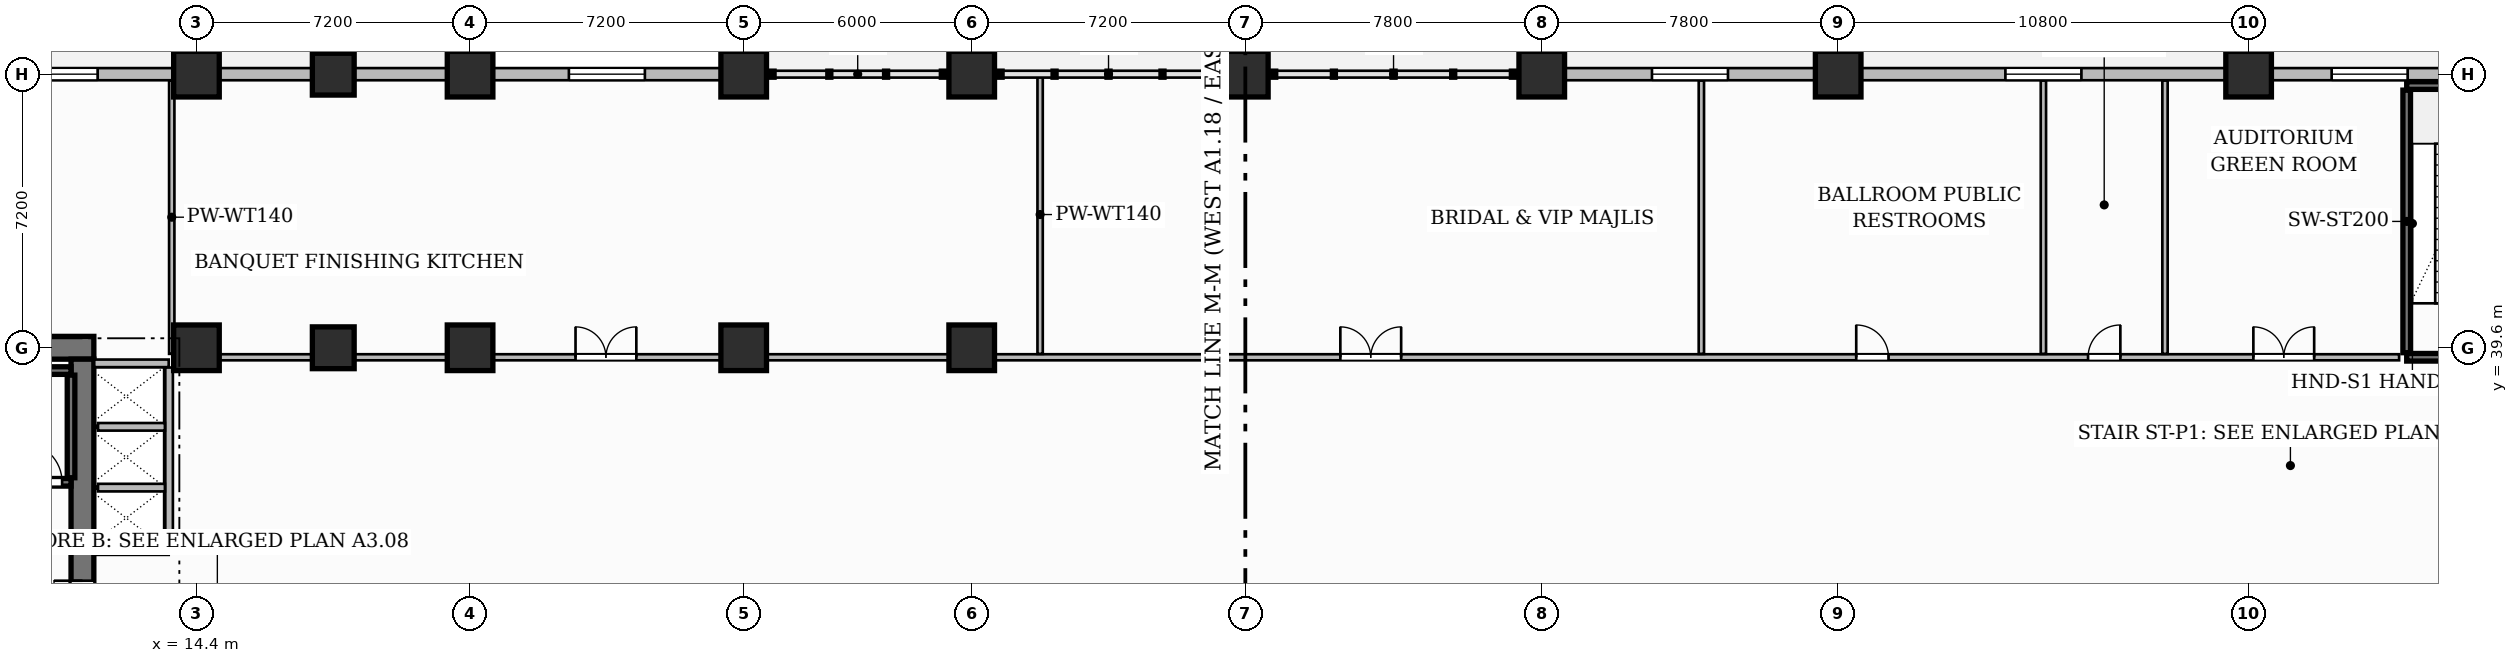
"""IFC4 building model, lengths in metres.
Left out: names, types, materials, properties, quantities, classifications, styles, units other than length and angle.
Written with IfcOpenShell. Run it as: python <this file> out.ifc"""

import sys

from ifc_helpers import new_model, si_unit, direction, frame, frame_2d, origin, origin_2d, place, context, subcontext, project, spatial, rectangle, extrude, source, transform, mapped, element, fill, save


model = new_model("IFC4")
c1 = context("Model", 3, precision=1e-05, world=origin(), true_north=direction((0.0, 1.0)))
c2 = subcontext(c1, "Body", "Model", "MODEL_VIEW")
j1 = project(units=[si_unit("LENGTHUNIT", "METRE"), si_unit("PLANEANGLEUNIT", "RADIAN")], contexts=[c1])
p1 = place(None, origin())
s1 = spatial("IfcSite", under=j1, at=p1, CompositionType="ELEMENT")
p2 = place(p1, origin())
s2 = spatial("IfcBuilding", under=s1, at=p2, CompositionType="ELEMENT")
p3 = place(p2, frame((0.0, 0.0, 16.2)))
s3 = spatial("IfcBuildingStorey", under=s2, at=p3, CompositionType="ELEMENT", Elevation=16.2)
p4 = place(p3, frame((3.3, 39.6, 0.0), z_axis=(0.0, 0.0, 1.0), x_axis=(1.0, 0.0, 0.0)))
e1 = element("IfcWall", 1, at=p4, inside=s3, PredefinedType="SHEAR", context=c2, shape_type="SweptSolid", body=[
    extrude(rectangle(XDim=8.4, YDim=0.6, at=frame_2d((4.2, 0.0))), origin(), (0.0, 0.0, 1.0), 5.4),
])
p5 = place(p3, frame((11.4, 25.5, 0.0), z_axis=(0.0, 0.0, 1.0), x_axis=(0.0, 1.0, 0.0)))
e2 = element("IfcWall", 2, at=p5, inside=s3, PredefinedType="SHEAR", context=c2, shape_type="SweptSolid", body=[
    extrude(rectangle(XDim=13.8, YDim=0.6, at=frame_2d((6.9, 0.0))), origin(), (0.0, 0.0, 1.0), 5.4),
])
p6 = place(p5, frame((6.47, 0.0, 0.0)))
e3 = element("IfcOpeningElement", 3, at=p6, cuts=e2, PredefinedType="OPENING", context=c2, shape_type="SweptSolid", body=[
    extrude(rectangle(XDim=1.5, YDim=2.2, at=frame_2d((0.75, 1.1))), frame((0.0, 0.31, 0.0), z_axis=(0.0, -1.0, 0.0), x_axis=(1.0, 0.0, 0.0)), (0.0, 0.0, 1.0), 0.62),
])
m1 = source(origin(), c2, "Body", "SweptSolid", [
    extrude(rectangle(XDim=1.2, YDim=1.2, at=origin_2d()), origin(), (0.0, 0.0, 1.0), 5.4),
])
for number, where, z_axis, x_axis in (
    (4, (14.4, 39.6, 0.0), (0.0, 0.0, 1.0), (1.0, 0.0, 0.0)),
    (5, (14.4, 46.8, 0.0), (0.0, 0.0, 1.0), (1.0, 0.0, 0.0)),
    (6, (21.6, 39.6, 0.0), (0.0, 0.0, 1.0), (1.0, 0.0, 0.0)),
    (7, (21.6, 46.8, 0.0), (0.0, 0.0, 1.0), (1.0, 0.0, 0.0)),
    (8, (28.8, 39.6, 0.0), (0.0, 0.0, 1.0), (1.0, 0.0, 0.0)),
    (9, (28.8, 46.8, 0.0), (0.0, 0.0, 1.0), (1.0, 0.0, 0.0)),
    (10, (34.8, 39.6, 0.0), (0.0, 0.0, 1.0), (1.0, 0.0, 0.0)),
    (11, (34.8, 46.8, 0.0), (0.0, 0.0, 1.0), (1.0, 0.0, 0.0)),
    (12, (42.0, 46.8, 0.0), (0.0, 0.0, 1.0), (1.0, 0.0, 0.0)),
    (13, (49.8, 46.8, 0.0), (0.0, 0.0, 1.0), (1.0, 0.0, 0.0)),
    (14, (57.6, 46.8, 0.0), (0.0, 0.0, 1.0), (1.0, 0.0, 0.0)),
    (15, (68.4, 46.8, 0.0), (0.0, 0.0, 1.0), (1.0, 0.0, 0.0)),
):
    element("IfcColumn", number, at=place(p3, frame(where, z_axis=z_axis, x_axis=x_axis)), inside=s3, PredefinedType="COLUMN", context=c2, shape_type="MappedRepresentation", body=[
        mapped(m1, transform((0.0, 0.0, 0.0), scale=1.0)),
    ])
m2 = source(origin(), c2, "Body", "SweptSolid", [
    extrude(rectangle(XDim=1.1, YDim=1.1, at=origin_2d()), origin(), (0.0, 0.0, 1.0), 5.4),
])
for number, where, z_axis, x_axis in (
    (16, (18.0, 39.6, 0.0), (0.0, 0.0, 1.0), (1.0, 0.0, 0.0)),
    (17, (18.0, 46.8, 0.0), (0.0, 0.0, 1.0), (1.0, 0.0, 0.0)),
):
    element("IfcColumn", number, at=place(p3, frame(where, z_axis=z_axis, x_axis=x_axis)), inside=s3, PredefinedType="COLUMN", context=c2, shape_type="MappedRepresentation", body=[
        mapped(m2, transform((0.0, 0.0, 0.0), scale=1.0)),
    ])
p7 = place(p3, frame((4.0, 39.0, 0.0), z_axis=(0.0, 0.0, 1.0), x_axis=(1.0, 0.0, 0.0)))
e18 = element("IfcWall", 18, at=p7, inside=s3, PredefinedType="SHEAR", context=c2, shape_type="SweptSolid", body=[
    extrude(rectangle(XDim=7.1, YDim=0.2, at=frame_2d((3.55, 0.0))), origin(), (0.0, 0.0, 1.0), 5.4),
])
p8 = place(p3, frame((11.1, 36.18, 0.0), z_axis=(0.0, 0.0, 1.0), x_axis=(0.0, 1.0, 0.0)))
e19 = element("IfcWall", 19, at=p8, inside=s3, PredefinedType="SHEAR", context=c2, shape_type="SweptSolid", body=[
    extrude(rectangle(XDim=2.7, YDim=0.2, at=frame_2d((1.35, 0.0))), origin(), (0.0, 0.0, 1.0), 5.4),
])
p9 = place(p3, frame((4.0, 36.06, 0.0), z_axis=(0.0, 0.0, 1.0), x_axis=(1.0, 0.0, 0.0)))
e20 = element("IfcWall", 20, at=p9, inside=s3, PredefinedType="SHEAR", context=c2, shape_type="SweptSolid", body=[
    extrude(rectangle(XDim=7.1, YDim=0.2, at=frame_2d((3.55, 0.0))), origin(), (0.0, 0.0, 1.0), 5.4),
])
p10 = place(p9, frame((5.815, 0.0, 0.0)))
e21 = element("IfcOpeningElement", 21, at=p10, cuts=e20, PredefinedType="OPENING", context=c2, shape_type="SweptSolid", body=[
    extrude(rectangle(XDim=1.05, YDim=2.2, at=frame_2d((0.525, 1.1))), frame((0.0, 0.11, 0.0), z_axis=(0.0, -1.0, 0.0), x_axis=(1.0, 0.0, 0.0)), (0.0, 0.0, 1.0), 0.22),
])
for number, where, z_axis, x_axis in (
    (22, (11.71, 34.25, 0.0), (0.0, 0.0, 1.0), (1.0, 0.0, 0.0)),
    (23, (11.71, 39.19, 0.0), (0.0, 0.0, 1.0), (1.0, 0.0, 0.0)),
):
    element("IfcWall", number, at=place(p3, frame(where, z_axis=z_axis, x_axis=x_axis)), inside=s3, PredefinedType="PARTITIONING", context=c2, shape_type="SweptSolid", body=[
        extrude(rectangle(XDim=1.96, YDim=0.2, at=frame_2d((0.98, 0.0))), origin(), (0.0, 0.0, 1.0), 5.1),
    ])
p11 = place(p3, frame((13.68, 34.36, 0.0), z_axis=(0.0, 0.0, 1.0), x_axis=(0.0, 1.0, 0.0)))
e24 = element("IfcWall", 24, at=p11, inside=s3, PredefinedType="PARTITIONING", context=c2, shape_type="SweptSolid", body=[
    extrude(rectangle(XDim=4.72, YDim=0.2, at=frame_2d((2.36, 0.0))), origin(), (0.0, 0.0, 1.0), 5.1),
])
for number, where, z_axis, x_axis in (
    (25, (11.81, 35.92, 0.0), (0.0, 0.0, 1.0), (1.0, 0.0, 0.0)),
    (26, (11.81, 37.52, 0.0), (0.0, 0.0, 1.0), (1.0, 0.0, 0.0)),
):
    element("IfcWall", number, at=place(p3, frame(where, z_axis=z_axis, x_axis=x_axis)), inside=s3, PredefinedType="PARTITIONING", context=c2, shape_type="SweptSolid", body=[
        extrude(rectangle(XDim=1.76, YDim=0.2, at=frame_2d((0.88, 0.0))), origin(), (0.0, 0.0, 1.0), 5.1),
    ])
p12 = place(p3, frame((72.56, 39.47, 0.0), z_axis=(0.0, 0.0, 1.0), x_axis=(0.0, 1.0, 0.0)))
e27 = element("IfcWall", 27, at=p12, inside=s3, PredefinedType="SHEAR", context=c2, shape_type="SweptSolid", body=[
    extrude(rectangle(XDim=6.91, YDim=0.2, at=frame_2d((3.455, 0.0))), origin(), (0.0, 0.0, 1.0), 5.4),
])
p13 = place(p3, frame((72.56, 46.5, 0.0), z_axis=(0.0, 0.0, 1.0), x_axis=(1.0, 0.0, 0.0)))
e28 = element("IfcWall", 28, at=p13, inside=s3, PredefinedType="SHEAR", context=c2, shape_type="SweptSolid", body=[
    extrude(rectangle(XDim=2.94, YDim=0.2, at=frame_2d((1.47, 0.0))), origin(), (0.0, 0.0, 1.0), 5.4),
])
p14 = place(p3, frame((72.56, 39.35, 0.0), z_axis=(0.0, 0.0, 1.0), x_axis=(1.0, 0.0, 0.0)))
e29 = element("IfcWall", 29, at=p14, inside=s3, PredefinedType="SHEAR", context=c2, shape_type="SweptSolid", body=[
    extrude(rectangle(XDim=2.94, YDim=0.2, at=frame_2d((1.47, 0.0))), origin(), (0.0, 0.0, 1.0), 5.4),
])
p15 = place(p14, frame((0.985, 0.0, 0.0)))
e30 = element("IfcOpeningElement", 30, at=p15, cuts=e29, PredefinedType="OPENING", context=c2, shape_type="SweptSolid", body=[
    extrude(rectangle(XDim=1.05, YDim=2.2, at=frame_2d((0.525, 1.1))), frame((0.0, 0.11, 0.0), z_axis=(0.0, -1.0, 0.0), x_axis=(1.0, 0.0, 0.0)), (0.0, 0.0, 1.0), 0.22),
])
p16 = place(p3, frame((13.75, 39.44, 0.0), z_axis=(0.0, 0.0, 1.0), x_axis=(0.0, 1.0, 0.0)))
e31 = element("IfcWall", 31, at=p16, inside=s3, PredefinedType="PARTITIONING", context=c2, shape_type="SweptSolid", body=[
    extrude(rectangle(XDim=7.192, YDim=0.14, at=frame_2d((3.596, 0.0))), origin(), (0.0, 0.0, 1.0), 5.1),
])
p17 = place(p3, frame((13.84, 39.35, 0.0), z_axis=(0.0, 0.0, 1.0), x_axis=(1.0, 0.0, 0.0)))
e32 = element("IfcWall", 32, at=p17, inside=s3, PredefinedType="PARTITIONING", context=c2, shape_type="SweptSolid", body=[
    extrude(rectangle(XDim=58.52, YDim=0.16, at=frame_2d((29.26, 0.0))), origin(), (0.0, 0.0, 1.0), 4.185),
])
p18 = place(p17, frame((10.535, 0.0, 0.0)))
e33 = element("IfcOpeningElement", 33, at=p18, cuts=e32, PredefinedType="OPENING", context=c2, shape_type="SweptSolid", body=[
    extrude(rectangle(XDim=1.6, YDim=2.4, at=frame_2d((0.8, 1.2))), frame((0.0, 0.09, 0.0), z_axis=(0.0, -1.0, 0.0), x_axis=(1.0, 0.0, 0.0)), (0.0, 0.0, 1.0), 0.18),
])
p19 = place(p17, frame((30.66, 0.0, 0.0)))
e34 = element("IfcOpeningElement", 34, at=p19, cuts=e32, PredefinedType="OPENING", context=c2, shape_type="SweptSolid", body=[
    extrude(rectangle(XDim=1.6, YDim=2.4, at=frame_2d((0.8, 1.2))), frame((0.0, 0.09, 0.0), z_axis=(0.0, -1.0, 0.0), x_axis=(1.0, 0.0, 0.0)), (0.0, 0.0, 1.0), 0.18),
])
p20 = place(p17, frame((44.235, 0.0, 0.0)))
e35 = element("IfcOpeningElement", 35, at=p20, cuts=e32, PredefinedType="OPENING", context=c2, shape_type="SweptSolid", body=[
    extrude(rectangle(XDim=0.85, YDim=2.1, at=frame_2d((0.425, 1.05))), frame((0.0, 0.09, 0.0), z_axis=(0.0, -1.0, 0.0), x_axis=(1.0, 0.0, 0.0)), (0.0, 0.0, 1.0), 0.18),
])
p21 = place(p17, frame((50.335, 0.0, 0.0)))
e36 = element("IfcOpeningElement", 36, at=p21, cuts=e32, PredefinedType="OPENING", context=c2, shape_type="SweptSolid", body=[
    extrude(rectangle(XDim=0.85, YDim=2.1, at=frame_2d((0.425, 1.05))), frame((0.0, 0.09, 0.0), z_axis=(0.0, -1.0, 0.0), x_axis=(1.0, 0.0, 0.0)), (0.0, 0.0, 1.0), 0.18),
])
p22 = place(p17, frame((54.685, 0.0, 0.0)))
e37 = element("IfcOpeningElement", 37, at=p22, cuts=e32, PredefinedType="OPENING", context=c2, shape_type="SweptSolid", body=[
    extrude(rectangle(XDim=1.6, YDim=2.4, at=frame_2d((0.8, 1.2))), frame((0.0, 0.09, 0.0), z_axis=(0.0, -1.0, 0.0), x_axis=(1.0, 0.0, 0.0)), (0.0, 0.0, 1.0), 0.18),
])
p23 = place(p3, frame((36.6, 39.44, 0.0), z_axis=(0.0, 0.0, 1.0), x_axis=(0.0, 1.0, 0.0)))
e38 = element("IfcWall", 38, at=p23, inside=s3, PredefinedType="PARTITIONING", context=c2, shape_type="SweptSolid", body=[
    extrude(rectangle(XDim=7.332, YDim=0.14, at=frame_2d((3.666, 0.0))), origin(), (0.0, 0.0, 1.0), 5.1),
])
for number, where, z_axis, x_axis in (
    (39, (54.0, 39.44, 0.0), (0.0, 0.0, 1.0), (0.0, 1.0, 0.0)),
    (40, (63.0, 39.44, 0.0), (0.0, 0.0, 1.0), (0.0, 1.0, 0.0)),
    (41, (66.2, 39.44, 0.0), (0.0, 0.0, 1.0), (0.0, 1.0, 0.0)),
):
    element("IfcWall", number, at=place(p3, frame(where, z_axis=z_axis, x_axis=x_axis)), inside=s3, PredefinedType="PARTITIONING", context=c2, shape_type="SweptSolid", body=[
        extrude(rectangle(XDim=7.192, YDim=0.14, at=frame_2d((3.596, 0.0))), origin(), (0.0, 0.0, 1.0), 5.1),
    ])
p24 = place(p3, frame((-4.8, 46.8, 0.0), z_axis=(0.0, 0.0, 1.0), x_axis=(1.0, 0.0, 0.0)))
e42 = element("IfcWall", 42, at=p24, inside=s3, PredefinedType="SOLIDWALL", context=c2, shape_type="SweptSolid", body=[
    extrude(rectangle(XDim=33.6, YDim=0.32, at=frame_2d((16.8, 0.0))), origin(), (0.0, 0.0, 1.0), 4.185),
])
p25 = place(p24, frame((1.4, 0.0, 0.75)))
e43 = element("IfcOpeningElement", 43, at=p25, cuts=e42, PredefinedType="OPENING", context=c2, shape_type="SweptSolid", body=[
    extrude(rectangle(XDim=2.0, YDim=2.6, at=frame_2d((1.0, 1.3))), frame((0.0, 0.17, 0.0), z_axis=(0.0, -1.0, 0.0), x_axis=(1.0, 0.0, 0.0)), (0.0, 0.0, 1.0), 0.34),
])
p26 = place(p24, frame((7.4, 0.0, 0.75)))
e44 = element("IfcOpeningElement", 44, at=p26, cuts=e42, PredefinedType="OPENING", context=c2, shape_type="SweptSolid", body=[
    extrude(rectangle(XDim=2.0, YDim=2.6, at=frame_2d((1.0, 1.3))), frame((0.0, 0.17, 0.0), z_axis=(0.0, -1.0, 0.0), x_axis=(1.0, 0.0, 0.0)), (0.0, 0.0, 1.0), 0.34),
])
p27 = place(p24, frame((14.6, 0.0, 0.75)))
e45 = element("IfcOpeningElement", 45, at=p27, cuts=e42, PredefinedType="OPENING", context=c2, shape_type="SweptSolid", body=[
    extrude(rectangle(XDim=2.0, YDim=2.6, at=frame_2d((1.0, 1.3))), frame((0.0, 0.17, 0.0), z_axis=(0.0, -1.0, 0.0), x_axis=(1.0, 0.0, 0.0)), (0.0, 0.0, 1.0), 0.34),
])
p28 = place(p24, frame((29.0, 0.0, 0.75)))
e46 = element("IfcOpeningElement", 46, at=p28, cuts=e42, PredefinedType="OPENING", context=c2, shape_type="SweptSolid", body=[
    extrude(rectangle(XDim=2.0, YDim=2.6, at=frame_2d((1.0, 1.3))), frame((0.0, 0.17, 0.0), z_axis=(0.0, -1.0, 0.0), x_axis=(1.0, 0.0, 0.0)), (0.0, 0.0, 1.0), 0.34),
])
p29 = place(p3, frame((49.8, 46.8, 0.0), z_axis=(0.0, 0.0, 1.0), x_axis=(1.0, 0.0, 0.0)))
e47 = element("IfcWall", 47, at=p29, inside=s3, PredefinedType="SOLIDWALL", context=c2, shape_type="SweptSolid", body=[
    extrude(rectangle(XDim=30.6, YDim=0.32, at=frame_2d((15.3, 0.0))), origin(), (0.0, 0.0, 1.0), 4.185),
])
p30 = place(p29, frame((2.9, 0.0, 0.75)))
e48 = element("IfcOpeningElement", 48, at=p30, cuts=e47, PredefinedType="OPENING", context=c2, shape_type="SweptSolid", body=[
    extrude(rectangle(XDim=2.0, YDim=2.6, at=frame_2d((1.0, 1.3))), frame((0.0, 0.17, 0.0), z_axis=(0.0, -1.0, 0.0), x_axis=(1.0, 0.0, 0.0)), (0.0, 0.0, 1.0), 0.34),
])
p31 = place(p29, frame((12.2, 0.0, 0.75)))
e49 = element("IfcOpeningElement", 49, at=p31, cuts=e47, PredefinedType="OPENING", context=c2, shape_type="SweptSolid", body=[
    extrude(rectangle(XDim=2.0, YDim=2.6, at=frame_2d((1.0, 1.3))), frame((0.0, 0.17, 0.0), z_axis=(0.0, -1.0, 0.0), x_axis=(1.0, 0.0, 0.0)), (0.0, 0.0, 1.0), 0.34),
])
p32 = place(p29, frame((20.785, 0.0, 0.75)))
e50 = element("IfcOpeningElement", 50, at=p32, cuts=e47, PredefinedType="OPENING", context=c2, shape_type="SweptSolid", body=[
    extrude(rectangle(XDim=2.0, YDim=2.6, at=frame_2d((1.0, 1.3))), frame((0.0, 0.17, 0.0), z_axis=(0.0, -1.0, 0.0), x_axis=(1.0, 0.0, 0.0)), (0.0, 0.0, 1.0), 0.34),
])
p33 = place(p29, frame((25.445, 0.0, 0.75)))
e51 = element("IfcOpeningElement", 51, at=p33, cuts=e47, PredefinedType="OPENING", context=c2, shape_type="SweptSolid", body=[
    extrude(rectangle(XDim=2.0, YDim=2.6, at=frame_2d((1.0, 1.3))), frame((0.0, 0.17, 0.0), z_axis=(0.0, -1.0, 0.0), x_axis=(1.0, 0.0, 0.0)), (0.0, 0.0, 1.0), 0.34),
])
m3 = source(origin(), c2, "Body", "SweptSolid", [
    extrude(rectangle(XDim=1.05, YDim=2.2, at=frame_2d((0.525, 1.1))), frame((0.0, 0.025, 0.0), z_axis=(0.0, -1.0, 0.0), x_axis=(1.0, 0.0, 0.0)), (0.0, 0.0, 1.0), 0.05),
])
p34 = place(p10, origin())
e52 = element("IfcDoor", 52, at=p34, inside=s3, OperationType="SINGLE_SWING_LEFT", PredefinedType="DOOR", context=c2, shape_type="MappedRepresentation", body=[
    mapped(m3, transform((0.0, 0.0, 0.0), scale=1.0)),
])
fill(e21, e52)
m4 = source(origin(), c2, "Body", "SweptSolid", [
    extrude(rectangle(XDim=1.5, YDim=2.2, at=frame_2d((0.75, 1.1))), frame((0.0, 0.025, 0.0), z_axis=(0.0, -1.0, 0.0), x_axis=(1.0, 0.0, 0.0)), (0.0, 0.0, 1.0), 0.05),
])
p35 = place(p6, origin())
e53 = element("IfcDoor", 53, at=p35, inside=s3, OperationType="DOUBLE_DOOR_SINGLE_SWING", PredefinedType="DOOR", context=c2, shape_type="MappedRepresentation", body=[
    mapped(m4, transform((0.0, 0.0, 0.0), scale=1.0)),
])
fill(e3, e53)
m5 = source(origin(), c2, "Body", "SweptSolid", [
    extrude(rectangle(XDim=1.6, YDim=2.4, at=frame_2d((0.8, 1.2))), frame((0.0, 0.025, 0.0), z_axis=(0.0, -1.0, 0.0), x_axis=(1.0, 0.0, 0.0)), (0.0, 0.0, 1.0), 0.05),
])
p36 = place(p18, origin())
e54 = element("IfcDoor", 54, at=p36, inside=s3, OperationType="DOUBLE_DOOR_SINGLE_SWING", PredefinedType="DOOR", context=c2, shape_type="MappedRepresentation", body=[
    mapped(m5, transform((0.0, 0.0, 0.0), scale=1.0)),
])
fill(e33, e54)
p37 = place(p19, origin())
e55 = element("IfcDoor", 55, at=p37, inside=s3, OperationType="DOUBLE_DOOR_SINGLE_SWING", PredefinedType="DOOR", context=c2, shape_type="MappedRepresentation", body=[
    mapped(m5, transform((0.0, 0.0, 0.0), scale=1.0)),
])
fill(e34, e55)
m6 = source(origin(), c2, "Body", "SweptSolid", [
    extrude(rectangle(XDim=0.85, YDim=2.1, at=frame_2d((0.425, 1.05))), frame((0.0, 0.025, 0.0), z_axis=(0.0, -1.0, 0.0), x_axis=(1.0, 0.0, 0.0)), (0.0, 0.0, 1.0), 0.05),
])
p38 = place(p20, origin())
e56 = element("IfcDoor", 56, at=p38, inside=s3, OperationType="SINGLE_SWING_LEFT", PredefinedType="DOOR", context=c2, shape_type="MappedRepresentation", body=[
    mapped(m6, transform((0.0, 0.0, 0.0), scale=1.0)),
])
fill(e35, e56)
p39 = place(p21, origin())
e57 = element("IfcDoor", 57, at=p39, inside=s3, OperationType="SINGLE_SWING_RIGHT", PredefinedType="DOOR", context=c2, shape_type="MappedRepresentation", body=[
    mapped(m6, transform((0.0, 0.0, 0.0), scale=1.0)),
])
fill(e36, e57)
p40 = place(p22, origin())
e58 = element("IfcDoor", 58, at=p40, inside=s3, OperationType="DOUBLE_DOOR_SINGLE_SWING", PredefinedType="DOOR", context=c2, shape_type="MappedRepresentation", body=[
    mapped(m5, transform((0.0, 0.0, 0.0), scale=1.0)),
])
fill(e37, e58)
m7 = source(origin(), c2, "Body", "SweptSolid", [
    extrude(rectangle(XDim=2.0, YDim=2.6, at=frame_2d((1.0, 1.3))), frame((0.0, 0.03, 0.0), z_axis=(0.0, -1.0, 0.0), x_axis=(1.0, 0.0, 0.0)), (0.0, 0.0, 1.0), 0.06),
])
p41 = place(p27, origin())
e59 = element("IfcWindow", 59, at=p41, inside=s3, PartitioningType="DOUBLE_PANEL_VERTICAL", PredefinedType="WINDOW", context=c2, shape_type="MappedRepresentation", body=[
    mapped(m7, transform((0.0, 0.0, 0.0), scale=1.0)),
])
fill(e45, e59)
p42 = place(p28, origin())
e60 = element("IfcWindow", 60, at=p42, inside=s3, PartitioningType="DOUBLE_PANEL_VERTICAL", PredefinedType="WINDOW", context=c2, shape_type="MappedRepresentation", body=[
    mapped(m7, transform((0.0, 0.0, 0.0), scale=1.0)),
])
fill(e46, e60)
p43 = place(p30, origin())
e61 = element("IfcWindow", 61, at=p43, inside=s3, PartitioningType="DOUBLE_PANEL_VERTICAL", PredefinedType="WINDOW", context=c2, shape_type="MappedRepresentation", body=[
    mapped(m7, transform((0.0, 0.0, 0.0), scale=1.0)),
])
fill(e48, e61)
p44 = place(p31, origin())
e62 = element("IfcWindow", 62, at=p44, inside=s3, PartitioningType="DOUBLE_PANEL_VERTICAL", PredefinedType="WINDOW", context=c2, shape_type="MappedRepresentation", body=[
    mapped(m7, transform((0.0, 0.0, 0.0), scale=1.0)),
])
fill(e49, e62)
p45 = place(p32, origin())
e63 = element("IfcWindow", 63, at=p45, inside=s3, PartitioningType="DOUBLE_PANEL_VERTICAL", PredefinedType="WINDOW", context=c2, shape_type="MappedRepresentation", body=[
    mapped(m7, transform((0.0, 0.0, 0.0), scale=1.0)),
])
fill(e50, e63)
save(model, sys.argv[1])
